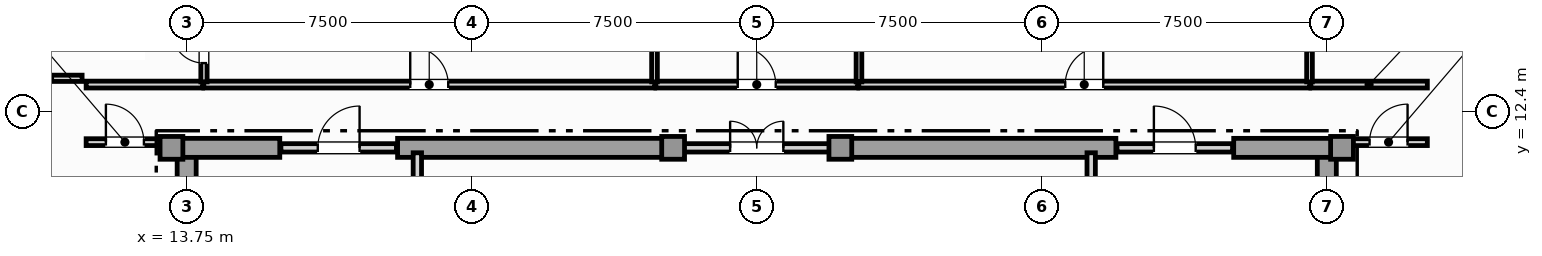
"""IFC4 building model, lengths in metres.
Left out: names, types, materials, properties, quantities, classifications, styles, units other than length and angle.
Written with IfcOpenShell. Run it as: python <this file> out.ifc"""

import sys

from ifc_helpers import new_model, si_unit, direction, frame, frame_2d, origin, origin_2d, place, context, subcontext, project, spatial, rectangle, extrude, element, fill, save


model = new_model("IFC4")
c1 = context("Model", 3, precision=1e-05, world=origin(), true_north=direction((0.0, 1.0)))
c2 = subcontext(c1, "Body", "Model", "MODEL_VIEW")
j1 = project(units=[si_unit("LENGTHUNIT", "METRE"), si_unit("PLANEANGLEUNIT", "RADIAN")], contexts=[c1])
p1 = place(None, origin())
s1 = spatial("IfcSite", under=j1, at=p1, CompositionType="ELEMENT")
p2 = place(p1, origin())
s2 = spatial("IfcBuilding", under=s1, at=p2, CompositionType="ELEMENT")
p3 = place(p2, frame((0.0, 0.0, 324.6)))
s3 = spatial("IfcBuildingStorey", under=s2, at=p3, CompositionType="ELEMENT", Elevation=324.6)
for number, where, z_axis, x_axis in (
    (1, (13.75, 0.92, 0.0), (0.0, 0.0, 1.0), (0.0, 1.0, 0.0)),
    (2, (43.75, 0.92, 0.0), (0.0, 0.0, 1.0), (0.0, 1.0, 0.0)),
):
    element("IfcWall", number, at=place(p3, frame(where, z_axis=z_axis, x_axis=x_axis)), inside=s3, PredefinedType="SHEAR", context=c2, shape_type="SweptSolid", body=[
        extrude(rectangle(XDim=10.53, YDim=0.5, at=frame_2d((5.265, 0.0))), origin(), (0.0, 0.0, 1.0), 3.65),
    ])
p4 = place(p3, frame((13.25, 11.45, 0.0), z_axis=(0.0, 0.0, 1.0), x_axis=(1.0, 0.0, 0.0)))
e3 = element("IfcWall", 3, at=p4, inside=s3, PredefinedType="SHEAR", context=c2, shape_type="SweptSolid", body=[
    extrude(rectangle(XDim=2.95, YDim=0.5, at=frame_2d((1.475, 0.0))), origin(), (0.0, 0.0, 1.0), 3.65),
])
for number, where, z_axis, x_axis in (
    (4, (19.3, 11.45, 0.0), (0.0, 0.0, 1.0), (1.0, 0.0, 0.0)),
    (5, (30.9, 11.45, 0.0), (0.0, 0.0, 1.0), (1.0, 0.0, 0.0)),
):
    element("IfcWall", number, at=place(p3, frame(where, z_axis=z_axis, x_axis=x_axis)), inside=s3, PredefinedType="SHEAR", context=c2, shape_type="SweptSolid", body=[
        extrude(rectangle(XDim=7.3, YDim=0.5, at=frame_2d((3.65, 0.0))), origin(), (0.0, 0.0, 1.0), 3.65),
    ])
p5 = place(p3, frame((41.3, 11.45, 0.0), z_axis=(0.0, 0.0, 1.0), x_axis=(1.0, 0.0, 0.0)))
e6 = element("IfcWall", 6, at=p5, inside=s3, PredefinedType="SHEAR", context=c2, shape_type="SweptSolid", body=[
    extrude(rectangle(XDim=2.95, YDim=0.5, at=frame_2d((1.475, 0.0))), origin(), (0.0, 0.0, 1.0), 3.65),
])
for number, where, z_axis, x_axis in (
    (7, (13.35, 11.45, 0.0), (0.0, 0.0, 1.0), (1.0, 0.0, 0.0)),
    (8, (44.15, 11.45, 0.0), (0.0, 0.0, 1.0), (1.0, 0.0, 0.0)),
    (9, (26.55, 11.45, 0.0), (0.0, 0.0, 1.0), (1.0, 0.0, 0.0)),
    (10, (30.95, 11.45, 0.0), (0.0, 0.0, 1.0), (1.0, 0.0, 0.0)),
):
    element("IfcColumn", number, at=place(p3, frame(where, z_axis=z_axis, x_axis=x_axis)), inside=s3, PredefinedType="COLUMN", context=c2, shape_type="SweptSolid", body=[
        extrude(rectangle(XDim=0.6, YDim=0.6, at=origin_2d()), origin(), (0.0, 0.0, 1.0), 3.85),
    ])
p6 = place(p3, frame((19.82, 8.52, 0.0), z_axis=(0.0, 0.0, 1.0), x_axis=(0.0, 1.0, 0.0)))
e11 = element("IfcWall", 11, at=p6, inside=s3, PredefinedType="SOLIDWALL", context=c2, shape_type="SweptSolid", body=[
    extrude(rectangle(XDim=2.8, YDim=0.22, at=frame_2d((1.4, 0.0))), origin(), (0.0, 0.0, 1.0), 3.105),
])
p7 = place(p6, frame((0.85, 0.0, 0.0)))
e12 = element("IfcOpeningElement", 12, at=p7, cuts=e11, PredefinedType="OPENING", context=c2, shape_type="SweptSolid", body=[
    extrude(rectangle(XDim=1.1, YDim=2.2, at=frame_2d((0.55, 1.1))), frame((0.0, 0.12, 0.0), z_axis=(0.0, -1.0, 0.0), x_axis=(1.0, 0.0, 0.0)), (0.0, 0.0, 1.0), 0.24),
])
p8 = place(p3, frame((37.55, 8.52, 0.0), z_axis=(0.0, 0.0, 1.0), x_axis=(0.0, 1.0, 0.0)))
e13 = element("IfcWall", 13, at=p8, inside=s3, PredefinedType="SOLIDWALL", context=c2, shape_type="SweptSolid", body=[
    extrude(rectangle(XDim=2.8, YDim=0.22, at=frame_2d((1.4, 0.0))), origin(), (0.0, 0.0, 1.0), 3.105),
])
p9 = place(p8, frame((0.85, 0.0, 0.0)))
e14 = element("IfcOpeningElement", 14, at=p9, cuts=e13, PredefinedType="OPENING", context=c2, shape_type="SweptSolid", body=[
    extrude(rectangle(XDim=1.1, YDim=2.2, at=frame_2d((0.55, 1.1))), frame((0.0, 0.12, 0.0), z_axis=(0.0, -1.0, 0.0), x_axis=(1.0, 0.0, 0.0)), (0.0, 0.0, 1.0), 0.24),
])
p10 = place(p3, frame((16.23, 11.45, 0.0), z_axis=(0.0, 0.0, 1.0), x_axis=(1.0, 0.0, 0.0)))
e15 = element("IfcWall", 15, at=p10, inside=s3, PredefinedType="SOLIDWALL", context=c2, shape_type="SweptSolid", body=[
    extrude(rectangle(XDim=3.04, YDim=0.22, at=frame_2d((1.52, 0.0))), origin(), (0.0, 0.0, 1.0), 3.65),
])
p11 = place(p10, frame((0.97, 0.0, 0.0)))
e16 = element("IfcOpeningElement", 16, at=p11, cuts=e15, PredefinedType="OPENING", context=c2, shape_type="SweptSolid", body=[
    extrude(rectangle(XDim=1.1, YDim=2.2, at=frame_2d((0.55, 1.1))), frame((0.0, 0.12, 0.0), z_axis=(0.0, -1.0, 0.0), x_axis=(1.0, 0.0, 0.0)), (0.0, 0.0, 1.0), 0.24),
])
p12 = place(p3, frame((26.63, 11.45, 0.0), z_axis=(0.0, 0.0, 1.0), x_axis=(1.0, 0.0, 0.0)))
e17 = element("IfcWall", 17, at=p12, inside=s3, PredefinedType="SOLIDWALL", context=c2, shape_type="SweptSolid", body=[
    extrude(rectangle(XDim=4.24, YDim=0.22, at=frame_2d((2.12, 0.0))), origin(), (0.0, 0.0, 1.0), 3.65),
])
p13 = place(p12, frame((1.42, 0.0, 0.0)))
e18 = element("IfcOpeningElement", 18, at=p13, cuts=e17, PredefinedType="OPENING", context=c2, shape_type="SweptSolid", body=[
    extrude(rectangle(XDim=1.4, YDim=2.2, at=frame_2d((0.7, 1.1))), frame((0.0, 0.12, 0.0), z_axis=(0.0, -1.0, 0.0), x_axis=(1.0, 0.0, 0.0)), (0.0, 0.0, 1.0), 0.24),
])
p14 = place(p3, frame((38.23, 11.45, 0.0), z_axis=(0.0, 0.0, 1.0), x_axis=(1.0, 0.0, 0.0)))
e19 = element("IfcWall", 19, at=p14, inside=s3, PredefinedType="SOLIDWALL", context=c2, shape_type="SweptSolid", body=[
    extrude(rectangle(XDim=3.04, YDim=0.22, at=frame_2d((1.52, 0.0))), origin(), (0.0, 0.0, 1.0), 3.65),
])
p15 = place(p14, frame((0.97, 0.0, 0.0)))
e20 = element("IfcOpeningElement", 20, at=p15, cuts=e19, PredefinedType="OPENING", context=c2, shape_type="SweptSolid", body=[
    extrude(rectangle(XDim=1.1, YDim=2.2, at=frame_2d((0.55, 1.1))), frame((0.0, 0.12, 0.0), z_axis=(0.0, -1.0, 0.0), x_axis=(1.0, 0.0, 0.0)), (0.0, 0.0, 1.0), 0.24),
])
p16 = place(p3, frame((11.105, 11.6, 0.0), z_axis=(0.0, 0.0, 1.0), x_axis=(1.0, 0.0, 0.0)))
e21 = element("IfcWall", 21, at=p16, inside=s3, PredefinedType="PARTITIONING", context=c2, shape_type="SweptSolid", body=[
    extrude(rectangle(XDim=2.04, YDim=0.18, at=frame_2d((1.02, 0.0))), origin(), (0.0, 0.0, 1.0), 3.65),
])
p17 = place(p16, frame((0.52, 0.0, 0.0)))
e22 = element("IfcOpeningElement", 22, at=p17, cuts=e21, PredefinedType="OPENING", context=c2, shape_type="SweptSolid", body=[
    extrude(rectangle(XDim=1.0, YDim=2.15, at=frame_2d((0.5, 1.075))), frame((0.0, 0.1, 0.0), z_axis=(0.0, -1.0, 0.0), x_axis=(1.0, 0.0, 0.0)), (0.0, 0.0, 1.0), 0.2),
])
p18 = place(p3, frame((44.355, 11.6, 0.0), z_axis=(0.0, 0.0, 1.0), x_axis=(1.0, 0.0, 0.0)))
e23 = element("IfcWall", 23, at=p18, inside=s3, PredefinedType="PARTITIONING", context=c2, shape_type="SweptSolid", body=[
    extrude(rectangle(XDim=2.04, YDim=0.18, at=frame_2d((1.02, 0.0))), origin(), (0.0, 0.0, 1.0), 3.65),
])
p19 = place(p18, frame((0.52, 0.0, 0.0)))
e24 = element("IfcOpeningElement", 24, at=p19, cuts=e23, PredefinedType="OPENING", context=c2, shape_type="SweptSolid", body=[
    extrude(rectangle(XDim=1.0, YDim=2.15, at=frame_2d((0.5, 1.075))), frame((0.0, 0.1, 0.0), z_axis=(0.0, -1.0, 0.0), x_axis=(1.0, 0.0, 0.0)), (0.0, 0.0, 1.0), 0.2),
])
p20 = place(p3, frame((14.2, 13.115, 0.0), z_axis=(0.0, 0.0, 1.0), x_axis=(1.0, 0.0, 0.0)))
e25 = element("IfcWall", 25, at=p20, inside=s3, PredefinedType="PARTITIONING", context=c2, shape_type="SweptSolid", body=[
    extrude(rectangle(XDim=11.865, YDim=0.18, at=frame_2d((5.932, 0.0))), origin(), (0.0, 0.0, 1.0), 3.65),
])
p21 = place(p20, frame((5.432, 0.0, 0.0)))
e26 = element("IfcOpeningElement", 26, at=p21, cuts=e25, PredefinedType="OPENING", context=c2, shape_type="SweptSolid", body=[
    extrude(rectangle(XDim=1.0, YDim=2.15, at=frame_2d((0.5, 1.075))), frame((0.0, 0.1, 0.0), z_axis=(0.0, -1.0, 0.0), x_axis=(1.0, 0.0, 0.0)), (0.0, 0.0, 1.0), 0.2),
])
p22 = place(p3, frame((31.435, 13.115, 0.0), z_axis=(0.0, 0.0, 1.0), x_axis=(1.0, 0.0, 0.0)))
e27 = element("IfcWall", 27, at=p22, inside=s3, PredefinedType="PARTITIONING", context=c2, shape_type="SweptSolid", body=[
    extrude(rectangle(XDim=11.865, YDim=0.18, at=frame_2d((5.932, 0.0))), origin(), (0.0, 0.0, 1.0), 3.65),
])
p23 = place(p22, frame((5.432, 0.0, 0.0)))
e28 = element("IfcOpeningElement", 28, at=p23, cuts=e27, PredefinedType="OPENING", context=c2, shape_type="SweptSolid", body=[
    extrude(rectangle(XDim=1.0, YDim=2.15, at=frame_2d((0.5, 1.075))), frame((0.0, 0.1, 0.0), z_axis=(0.0, -1.0, 0.0), x_axis=(1.0, 0.0, 0.0)), (0.0, 0.0, 1.0), 0.2),
])
p24 = place(p3, frame((26.095, 13.115, 0.0), z_axis=(0.0, 0.0, 1.0), x_axis=(1.0, 0.0, 0.0)))
e29 = element("IfcWall", 29, at=p24, inside=s3, PredefinedType="PARTITIONING", context=c2, shape_type="SweptSolid", body=[
    extrude(rectangle(XDim=5.31, YDim=0.18, at=frame_2d((2.655, 0.0))), origin(), (0.0, 0.0, 1.0), 3.65),
])
p25 = place(p24, frame((2.155, 0.0, 0.0)))
e30 = element("IfcOpeningElement", 30, at=p25, cuts=e29, PredefinedType="OPENING", context=c2, shape_type="SweptSolid", body=[
    extrude(rectangle(XDim=1.0, YDim=2.15, at=frame_2d((0.5, 1.075))), frame((0.0, 0.1, 0.0), z_axis=(0.0, -1.0, 0.0), x_axis=(1.0, 0.0, 0.0)), (0.0, 0.0, 1.0), 0.2),
])
for number, where, z_axis, x_axis in (
    (31, (11.105, 13.115, 0.0), (0.0, 0.0, 1.0), (1.0, 0.0, 0.0)),
    (32, (43.33, 13.115, 0.0), (0.0, 0.0, 1.0), (1.0, 0.0, 0.0)),
):
    element("IfcWall", number, at=place(p3, frame(where, z_axis=z_axis, x_axis=x_axis)), inside=s3, PredefinedType="PARTITIONING", context=c2, shape_type="SweptSolid", body=[
        extrude(rectangle(XDim=3.065, YDim=0.18, at=frame_2d((1.533, 0.0))), origin(), (0.0, 0.0, 1.0), 3.65),
    ])
p26 = place(p3, frame((26.06, 13.185, 0.0), z_axis=(0.0, 0.0, 1.0), x_axis=(0.0, 1.0, 0.0)))
e33 = element("IfcWall", 33, at=p26, inside=s3, PredefinedType="PARTITIONING", context=c2, shape_type="SweptSolid", body=[
    extrude(rectangle(XDim=10.435, YDim=0.15, at=frame_2d((5.217, 0.0))), origin(), (0.0, 0.0, 1.0), 3.65),
])
p27 = place(p26, frame((4.757, 0.0, 0.0)))
e34 = element("IfcOpeningElement", 34, at=p27, cuts=e33, PredefinedType="OPENING", context=c2, shape_type="SweptSolid", body=[
    extrude(rectangle(XDim=0.92, YDim=2.1, at=frame_2d((0.46, 1.05))), frame((0.0, 0.085, 0.0), z_axis=(0.0, -1.0, 0.0), x_axis=(1.0, 0.0, 0.0)), (0.0, 0.0, 1.0), 0.17),
])
p28 = place(p3, frame((14.205, 13.185, 0.0), z_axis=(0.0, 0.0, 1.0), x_axis=(0.0, 1.0, 0.0)))
e35 = element("IfcWall", 35, at=p28, inside=s3, PredefinedType="PLUMBINGWALL", context=c2, shape_type="SweptSolid", body=[
    extrude(rectangle(XDim=1.84, YDim=0.165, at=frame_2d((0.92, 0.0))), origin(), (0.0, 0.0, 1.0), 3.65),
])
p29 = place(p28, frame((0.495, 0.0, 0.0)))
e36 = element("IfcOpeningElement", 36, at=p29, cuts=e35, PredefinedType="OPENING", context=c2, shape_type="SweptSolid", body=[
    extrude(rectangle(XDim=0.85, YDim=2.1, at=frame_2d((0.425, 1.05))), frame((0.0, 0.093, 0.0), z_axis=(0.0, -1.0, 0.0), x_axis=(1.0, 0.0, 0.0)), (0.0, 0.0, 1.0), 0.185),
])
p30 = place(p3, frame((31.44, 13.185, 0.0), z_axis=(0.0, 0.0, 1.0), x_axis=(0.0, 1.0, 0.0)))
e37 = element("IfcWall", 37, at=p30, inside=s3, PredefinedType="PARTITIONING", context=c2, shape_type="SweptSolid", body=[
    extrude(rectangle(XDim=10.435, YDim=0.15, at=frame_2d((5.217, 0.0))), origin(), (0.0, 0.0, 1.0), 3.65),
])
p31 = place(p30, frame((4.757, 0.0, 0.0)))
e38 = element("IfcOpeningElement", 38, at=p31, cuts=e37, PredefinedType="OPENING", context=c2, shape_type="SweptSolid", body=[
    extrude(rectangle(XDim=0.92, YDim=2.1, at=frame_2d((0.46, 1.05))), frame((0.0, 0.085, 0.0), z_axis=(0.0, -1.0, 0.0), x_axis=(1.0, 0.0, 0.0)), (0.0, 0.0, 1.0), 0.17),
])
p32 = place(p3, frame((43.295, 13.185, 0.0), z_axis=(0.0, 0.0, 1.0), x_axis=(0.0, 1.0, 0.0)))
e39 = element("IfcWall", 39, at=p32, inside=s3, PredefinedType="PARTITIONING", context=c2, shape_type="SweptSolid", body=[
    extrude(rectangle(XDim=2.531, YDim=0.15, at=frame_2d((1.266, 0.0))), origin(), (0.0, 0.0, 1.0), 3.65),
])
p33 = place(p32, frame((0.806, 0.0, 0.0)))
e40 = element("IfcOpeningElement", 40, at=p33, cuts=e39, PredefinedType="OPENING", context=c2, shape_type="SweptSolid", body=[
    extrude(rectangle(XDim=0.92, YDim=2.1, at=frame_2d((0.46, 1.05))), frame((0.0, 0.085, 0.0), z_axis=(0.0, -1.0, 0.0), x_axis=(1.0, 0.0, 0.0)), (0.0, 0.0, 1.0), 0.17),
])
p34 = place(p3, frame((10.999, 13.28, 0.0), z_axis=(0.0, 0.0, 1.0), x_axis=(-1.0, 0.0, 0.0)))
e41 = element("IfcWall", 41, at=p34, inside=s3, PredefinedType="PLUMBINGWALL", context=c2, shape_type="SweptSolid", body=[
    extrude(rectangle(XDim=1.714, YDim=0.165, at=frame_2d((0.857, 0.0))), origin(), (0.0, 0.0, 1.0), 3.65),
])
p35 = place(p11, origin())
e42 = element("IfcDoor", 42, at=p35, inside=s3, OperationType="SINGLE_SWING_RIGHT", PredefinedType="DOOR", context=c2, shape_type="SweptSolid", body=[
    extrude(rectangle(XDim=1.1, YDim=2.2, at=frame_2d((0.55, 1.1))), frame((0.0, 0.025, 0.0), z_axis=(0.0, -1.0, 0.0), x_axis=(1.0, 0.0, 0.0)), (0.0, 0.0, 1.0), 0.05),
])
fill(e16, e42)
p36 = place(p13, origin())
e43 = element("IfcDoor", 43, at=p36, inside=s3, OperationType="DOUBLE_DOOR_SINGLE_SWING", PredefinedType="DOOR", context=c2, shape_type="SweptSolid", body=[
    extrude(rectangle(XDim=1.4, YDim=2.2, at=frame_2d((0.7, 1.1))), frame((0.0, 0.025, 0.0), z_axis=(0.0, -1.0, 0.0), x_axis=(1.0, 0.0, 0.0)), (0.0, 0.0, 1.0), 0.05),
])
fill(e18, e43)
p37 = place(p15, origin())
e44 = element("IfcDoor", 44, at=p37, inside=s3, OperationType="SINGLE_SWING_LEFT", PredefinedType="DOOR", context=c2, shape_type="SweptSolid", body=[
    extrude(rectangle(XDim=1.1, YDim=2.2, at=frame_2d((0.55, 1.1))), frame((0.0, 0.025, 0.0), z_axis=(0.0, -1.0, 0.0), x_axis=(1.0, 0.0, 0.0)), (0.0, 0.0, 1.0), 0.05),
])
fill(e20, e44)
p38 = place(p17, origin())
e45 = element("IfcDoor", 45, at=p38, inside=s3, OperationType="SINGLE_SWING_LEFT", PredefinedType="DOOR", context=c2, shape_type="SweptSolid", body=[
    extrude(rectangle(XDim=1.0, YDim=2.15, at=frame_2d((0.5, 1.075))), frame((0.0, 0.025, 0.0), z_axis=(0.0, -1.0, 0.0), x_axis=(1.0, 0.0, 0.0)), (0.0, 0.0, 1.0), 0.05),
])
fill(e22, e45)
p39 = place(p19, origin())
e46 = element("IfcDoor", 46, at=p39, inside=s3, OperationType="SINGLE_SWING_RIGHT", PredefinedType="DOOR", context=c2, shape_type="SweptSolid", body=[
    extrude(rectangle(XDim=1.0, YDim=2.15, at=frame_2d((0.5, 1.075))), frame((0.0, 0.025, 0.0), z_axis=(0.0, -1.0, 0.0), x_axis=(1.0, 0.0, 0.0)), (0.0, 0.0, 1.0), 0.05),
])
fill(e24, e46)
p40 = place(p21, origin())
e47 = element("IfcDoor", 47, at=p40, inside=s3, OperationType="SINGLE_SWING_LEFT", PredefinedType="DOOR", context=c2, shape_type="SweptSolid", body=[
    extrude(rectangle(XDim=1.0, YDim=2.15, at=frame_2d((0.5, 1.075))), frame((0.0, 0.025, 0.0), z_axis=(0.0, -1.0, 0.0), x_axis=(1.0, 0.0, 0.0)), (0.0, 0.0, 1.0), 0.05),
])
fill(e26, e47)
p41 = place(p23, origin())
e48 = element("IfcDoor", 48, at=p41, inside=s3, OperationType="SINGLE_SWING_RIGHT", PredefinedType="DOOR", context=c2, shape_type="SweptSolid", body=[
    extrude(rectangle(XDim=1.0, YDim=2.15, at=frame_2d((0.5, 1.075))), frame((0.0, 0.025, 0.0), z_axis=(0.0, -1.0, 0.0), x_axis=(1.0, 0.0, 0.0)), (0.0, 0.0, 1.0), 0.05),
])
fill(e28, e48)
p42 = place(p25, origin())
e49 = element("IfcDoor", 49, at=p42, inside=s3, OperationType="SINGLE_SWING_LEFT", PredefinedType="DOOR", context=c2, shape_type="SweptSolid", body=[
    extrude(rectangle(XDim=1.0, YDim=2.15, at=frame_2d((0.5, 1.075))), frame((0.0, 0.025, 0.0), z_axis=(0.0, -1.0, 0.0), x_axis=(1.0, 0.0, 0.0)), (0.0, 0.0, 1.0), 0.05),
])
fill(e30, e49)
p43 = place(p29, origin())
e50 = element("IfcDoor", 50, at=p43, inside=s3, OperationType="SINGLE_SWING_RIGHT", PredefinedType="DOOR", context=c2, shape_type="SweptSolid", body=[
    extrude(rectangle(XDim=0.85, YDim=2.1, at=frame_2d((0.425, 1.05))), frame((0.0, 0.025, 0.0), z_axis=(0.0, -1.0, 0.0), x_axis=(1.0, 0.0, 0.0)), (0.0, 0.0, 1.0), 0.05),
])
fill(e36, e50)
save(model, sys.argv[1])
